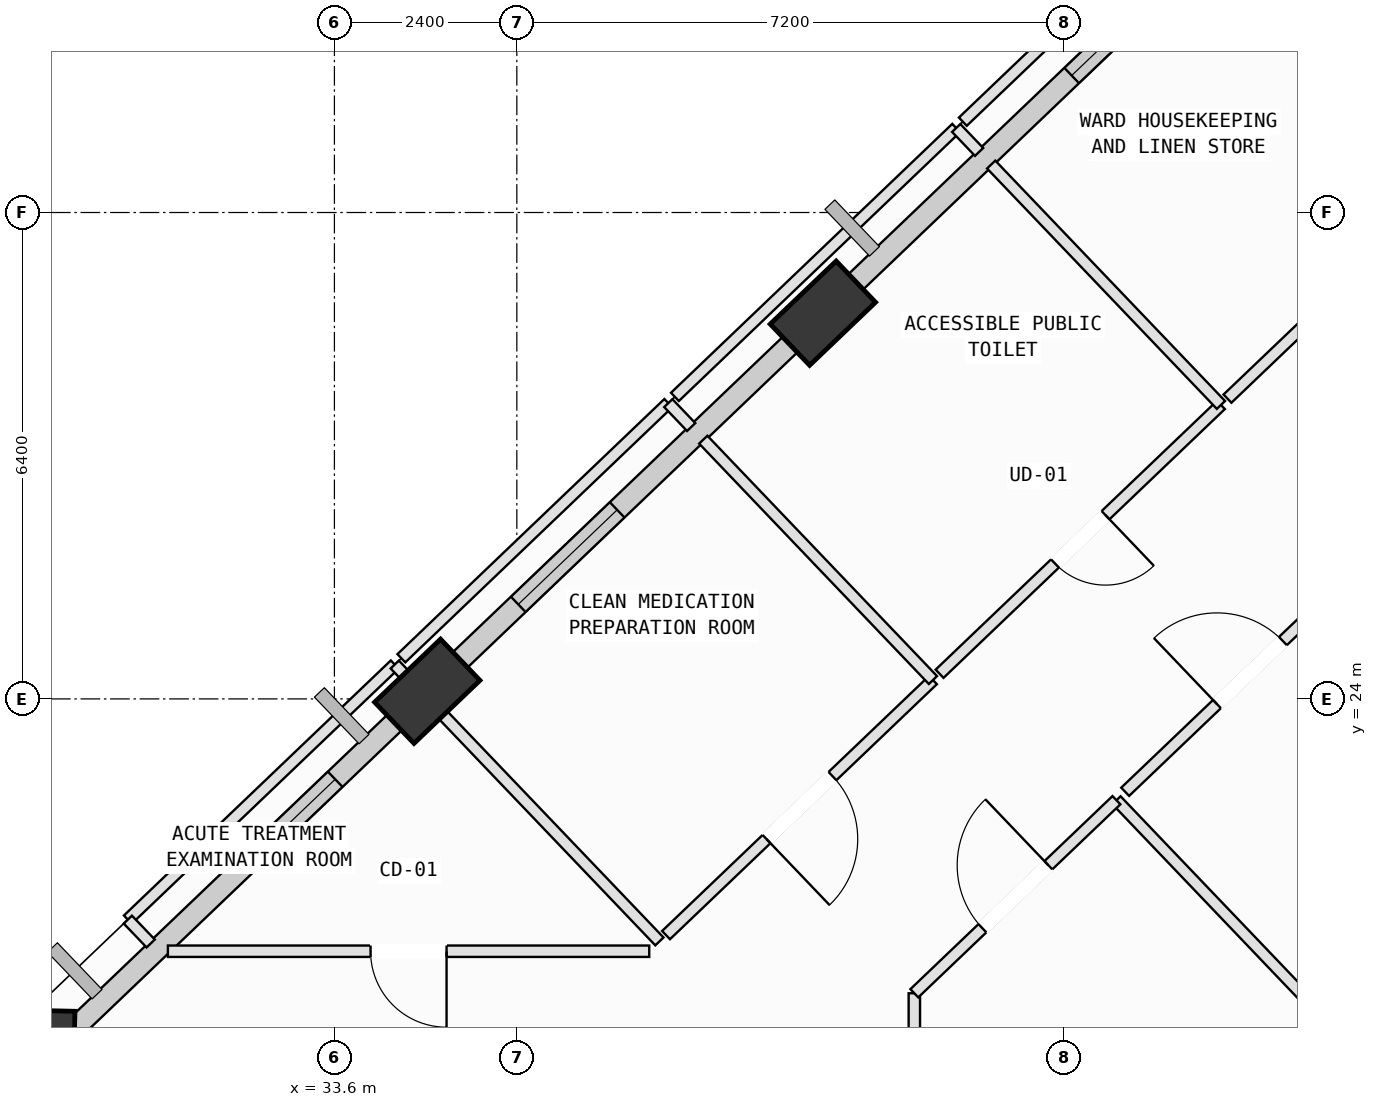
"""IFC4 building model, lengths in metres.
Left out: names, types, materials, properties, quantities, classifications, styles, units other than length and angle.
Written with IfcOpenShell. Run it as: python <this file> out.ifc"""

import sys

from ifc_helpers import new_model, si_unit, direction, frame, frame_2d, origin, origin_2d, place, context, subcontext, project, spatial, rectangle, extrude, element, fill, save


model = new_model("IFC4")
c1 = context("Model", 3, precision=1e-05, world=origin(), true_north=direction((0.0, 1.0)))
c2 = subcontext(c1, "Body", "Model", "MODEL_VIEW")
j1 = project(units=[si_unit("LENGTHUNIT", "METRE"), si_unit("PLANEANGLEUNIT", "RADIAN")], contexts=[c1])
p1 = place(None, origin())
s1 = spatial("IfcSite", under=j1, at=p1, CompositionType="ELEMENT")
p2 = place(p1, origin())
s2 = spatial("IfcBuilding", under=s1, at=p2, CompositionType="ELEMENT")
p3 = place(p2, frame((0.0, 0.0, 211.2)))
s3 = spatial("IfcBuildingStorey", under=s2, at=p3, CompositionType="ELEMENT", Elevation=211.2)
p4 = place(p3, frame((40.027, 29.075, 0.024), z_axis=(-0.017930255062, 0.026465547712, 0.999488909762), x_axis=(-0.211225801322, -0.977187740345, 0.022085764091)))
e1 = element("IfcColumn", 1, at=p4, inside=s3, PredefinedType="COLUMN", context=c2, shape_type="SweptSolid", body=[
    extrude(rectangle(XDim=1.2, YDim=0.75, at=origin_2d()), origin(), (0.0, 0.0, 1.0), 3.976),
])
p5 = place(p3, frame((34.822, 24.1, 0.007), z_axis=(0.002874568821, 0.005076366216, 0.999982983535), x_axis=(-0.969530948602, -0.244935696243, 0.004030435313)))
e2 = element("IfcColumn", 2, at=p5, inside=s3, PredefinedType="COLUMN", context=c2, shape_type="SweptSolid", body=[
    extrude(rectangle(XDim=1.2, YDim=0.75, at=origin_2d()), origin(), (0.0, 0.0, 1.0), 3.992),
])
p6 = place(p3, frame((29.798, 19.298, 0.019), z_axis=(0.022938777207, -0.015578741739, 0.999615483727), x_axis=(-0.813978214162, 0.580233554641, 0.027721633021)))
e3 = element("IfcColumn", 3, at=p6, inside=s3, PredefinedType="COLUMN", context=c2, shape_type="SweptSolid", body=[
    extrude(rectangle(XDim=1.2, YDim=0.75, at=origin_2d()), origin(), (0.0, 0.0, 1.0), 3.98),
])
p7 = place(p3, frame((45.703, 34.124, 0.0), z_axis=(0.0, 0.0, 1.0), x_axis=(0.793258339764, -0.608885216108, 0.0)))
e4 = element("IfcWall", 4, at=p7, inside=s3, PredefinedType="SOLIDWALL", context=c2, shape_type="SweptSolid", body=[
    extrude(rectangle(XDim=9.036, YDim=0.28, at=frame_2d((4.518, 0.0))), origin(), (0.0, 0.0, 1.0), 3.265),
])
p8 = place(p7, frame((1.479, 0.0, 0.75)))
e5 = element("IfcOpeningElement", 5, at=p8, cuts=e4, PredefinedType="OPENING", context=c2, shape_type="SweptSolid", body=[
    extrude(rectangle(XDim=2.0, YDim=1.95, at=frame_2d((1.0, 0.975))), frame((0.0, 0.15, 0.0), z_axis=(0.0, -1.0, 0.0), x_axis=(1.0, 0.0, 0.0)), (0.0, 0.0, 1.0), 0.3),
])
p9 = place(p3, frame((40.319, 29.353, 0.0), z_axis=(0.0, 0.0, 1.0), x_axis=(0.722967108735, 0.690882449977, 0.0)))
e6 = element("IfcWall", 6, at=p9, inside=s3, PredefinedType="SOLIDWALL", context=c2, shape_type="SweptSolid", body=[
    extrude(rectangle(XDim=6.78, YDim=0.28, at=frame_2d((3.39, 0.0))), origin(), (0.0, 0.0, 1.0), 2.765),
])
p10 = place(p9, frame((4.124, 0.0, 0.75)))
e7 = element("IfcOpeningElement", 7, at=p10, cuts=e6, PredefinedType="OPENING", context=c2, shape_type="SweptSolid", body=[
    extrude(rectangle(XDim=1.4, YDim=1.85, at=frame_2d((0.7, 0.925))), frame((0.0, 0.15, 0.0), z_axis=(0.0, -1.0, 0.0), x_axis=(1.0, 0.0, 0.0)), (0.0, 0.0, 1.0), 0.3),
])
p11 = place(p3, frame((35.117, 24.383, 0.0), z_axis=(0.0, 0.0, 1.0), x_axis=(0.722980120971, 0.690868833195, 0.0)))
e8 = element("IfcWall", 8, at=p11, inside=s3, PredefinedType="SOLIDWALL", context=c2, shape_type="SweptSolid", body=[
    extrude(rectangle(XDim=6.409, YDim=0.28, at=frame_2d((3.205, 0.0))), origin(), (0.0, 0.0, 1.0), 3.265),
])
p12 = place(p11, frame((1.247, 0.0, 0.75)))
e9 = element("IfcOpeningElement", 9, at=p12, cuts=e8, PredefinedType="OPENING", context=c2, shape_type="SweptSolid", body=[
    extrude(rectangle(XDim=1.8, YDim=2.05, at=frame_2d((0.9, 1.025))), frame((0.0, 0.15, 0.0), z_axis=(0.0, -1.0, 0.0), x_axis=(1.0, 0.0, 0.0)), (0.0, 0.0, 1.0), 0.3),
])
p13 = place(p3, frame((30.09, 19.579, 0.0), z_axis=(0.0, 0.0, 1.0), x_axis=(0.722961207673, 0.690888625033, 0.0)))
e10 = element("IfcWall", 10, at=p13, inside=s3, PredefinedType="SOLIDWALL", context=c2, shape_type="SweptSolid", body=[
    extrude(rectangle(XDim=6.158, YDim=0.28, at=frame_2d((3.079, 0.0))), origin(), (0.0, 0.0, 1.0), 2.765),
])
p14 = place(p13, frame((3.669, 0.0, 0.75)))
e11 = element("IfcOpeningElement", 11, at=p14, cuts=e10, PredefinedType="OPENING", context=c2, shape_type="SweptSolid", body=[
    extrude(rectangle(XDim=1.2, YDim=1.75, at=frame_2d((0.6, 0.875))), frame((0.0, 0.15, 0.0), z_axis=(0.0, -1.0, 0.0), x_axis=(1.0, 0.0, 0.0)), (0.0, 0.0, 1.0), 0.3),
])
p15 = place(p3, frame((43.889, 22.667, 0.0), z_axis=(0.0, 0.0, 1.0), x_axis=(0.690910559681, -0.722940245471, 0.0)))
e12 = element("IfcWall", 12, at=p15, inside=s3, PredefinedType="PARTITIONING", context=c2, shape_type="SweptSolid", body=[
    extrude(rectangle(XDim=13.484, YDim=0.15, at=frame_2d((6.742, 0.0))), origin(), (0.0, 0.0, 1.0), 3.415),
])
p16 = place(p3, frame((41.23, 18.828, 0.0), z_axis=(0.0, 0.0, 1.0), x_axis=(0.0, 1.0, 0.0)))
e13 = element("IfcWall", 13, at=p16, inside=s3, PredefinedType="PARTITIONING", context=c2, shape_type="SweptSolid", body=[
    extrude(rectangle(XDim=1.299, YDim=0.15, at=frame_2d((0.649, 0.0))), origin(), (0.0, 0.0, 1.0), 3.78),
])
p17 = place(p3, frame((41.23, 20.127, 0.0), z_axis=(0.0, 0.0, 1.0), x_axis=(0.723088697015, 0.690755192705, 0.0)))
e14 = element("IfcWall", 14, at=p17, inside=s3, PredefinedType="PARTITIONING", context=c2, shape_type="SweptSolid", body=[
    extrude(rectangle(XDim=3.677, YDim=0.15, at=frame_2d((1.839, 0.0))), origin(), (0.0, 0.0, 1.0), 2.765),
])
p18 = place(p17, frame((1.239, 0.0, 0.0)))
e15 = element("IfcOpeningElement", 15, at=p18, cuts=e14, PredefinedType="OPENING", context=c2, shape_type="SweptSolid", body=[
    extrude(rectangle(XDim=1.2, YDim=2.15, at=frame_2d((0.6, 1.075))), frame((0.0, 0.085, 0.0), z_axis=(0.0, -1.0, 0.0), x_axis=(1.0, 0.0, 0.0)), (0.0, 0.0, 1.0), 0.17),
])
p19 = place(p3, frame((44.004, 22.778, 0.0), z_axis=(0.0, 0.0, 1.0), x_axis=(0.723025899483, 0.69082092374, 0.0)))
e16 = element("IfcWall", 16, at=p19, inside=s3, PredefinedType="PARTITIONING", context=c2, shape_type="SweptSolid", body=[
    extrude(rectangle(XDim=4.541, YDim=0.15, at=frame_2d((2.271, 0.0))), origin(), (0.0, 0.0, 1.0), 2.765),
])
p20 = place(p19, frame((1.67, 0.0, 0.0)))
e17 = element("IfcOpeningElement", 17, at=p20, cuts=e16, PredefinedType="OPENING", context=c2, shape_type="SweptSolid", body=[
    extrude(rectangle(XDim=1.2, YDim=2.15, at=frame_2d((0.6, 1.075))), frame((0.0, 0.085, 0.0), z_axis=(0.0, -1.0, 0.0), x_axis=(1.0, 0.0, 0.0)), (0.0, 0.0, 1.0), 0.17),
])
p21 = place(p3, frame((30.882, 21.096, 0.0), z_axis=(0.0, 0.0, 1.0), x_axis=(0.722982323173, 0.690866528629, 0.0)))
e18 = element("IfcWall", 18, at=p21, inside=s3, PredefinedType="PARTITIONING", context=c2, shape_type="SweptSolid", body=[
    extrude(rectangle(XDim=4.858, YDim=0.15, at=frame_2d((2.429, 0.0))), origin(), (0.0, 0.0, 1.0), 3.78),
])
p22 = place(p3, frame((34.394, 24.452, 0.0), z_axis=(0.0, 0.0, 1.0), x_axis=(0.690963001326, -0.7228901236, 0.0)))
e19 = element("IfcWall", 19, at=p22, inside=s3, PredefinedType="PARTITIONING", context=c2, shape_type="SweptSolid", body=[
    extrude(rectangle(XDim=5.039, YDim=0.15, at=frame_2d((2.52, 0.0))), origin(), (0.0, 0.0, 1.0), 3.78),
])
p23 = place(p3, frame((37.742, 20.68, 0.0), z_axis=(0.0, 0.0, 1.0), x_axis=(-1.0, 0.0, 0.0)))
e20 = element("IfcWall", 20, at=p23, inside=s3, PredefinedType="PARTITIONING", context=c2, shape_type="SweptSolid", body=[
    extrude(rectangle(XDim=6.333, YDim=0.15, at=frame_2d((3.167, 0.0))), origin(), (0.0, 0.0, 1.0), 3.78),
])
p24 = place(p23, frame((2.667, 0.0, 0.0)))
e21 = element("IfcOpeningElement", 21, at=p24, cuts=e20, PredefinedType="OPENING", context=c2, shape_type="SweptSolid", body=[
    extrude(rectangle(XDim=1.0, YDim=2.12, at=frame_2d((0.5, 1.06))), frame((0.0, 0.085, 0.0), z_axis=(0.0, -1.0, 0.0), x_axis=(1.0, 0.0, 0.0)), (0.0, 0.0, 1.0), 0.17),
])
p25 = place(p3, frame((31.183, 20.782, 0.0), z_axis=(0.0, 0.0, 1.0), x_axis=(-0.692076018043, 0.721824622225, 0.0)))
e22 = element("IfcWall", 22, at=p25, inside=s3, PredefinedType="PARTITIONING", context=c2, shape_type="SweptSolid", body=[
    extrude(rectangle(XDim=0.435, YDim=0.15, at=frame_2d((0.218, 0.0))), origin(), (0.0, 0.0, 1.0), 3.78),
])
p26 = place(p3, frame((41.475, 24.248, 0.0), z_axis=(0.0, 0.0, 1.0), x_axis=(-0.723006310532, -0.690841425315, 0.0)))
e23 = element("IfcWall", 23, at=p26, inside=s3, PredefinedType="PARTITIONING", context=c2, shape_type="SweptSolid", body=[
    extrude(rectangle(XDim=4.858, YDim=0.15, at=frame_2d((2.429, 0.0))), origin(), (0.0, 0.0, 1.0), 2.765),
])
p27 = place(p26, frame((1.829, 0.0, 0.0)))
e24 = element("IfcOpeningElement", 24, at=p27, cuts=e23, PredefinedType="OPENING", context=c2, shape_type="SweptSolid", body=[
    extrude(rectangle(XDim=1.2, YDim=2.15, at=frame_2d((0.6, 1.075))), frame((0.0, 0.085, 0.0), z_axis=(0.0, -1.0, 0.0), x_axis=(1.0, 0.0, 0.0)), (0.0, 0.0, 1.0), 0.17),
])
p28 = place(p3, frame((34.481, 24.535, 0.0), z_axis=(0.0, 0.0, 1.0), x_axis=(0.722856813983, 0.690997848389, 0.0)))
e25 = element("IfcWall", 25, at=p28, inside=s3, PredefinedType="PARTITIONING", context=c2, shape_type="SweptSolid", body=[
    extrude(rectangle(XDim=4.858, YDim=0.15, at=frame_2d((2.429, 0.0))), origin(), (0.0, 0.0, 1.0), 3.78),
])
p29 = place(p3, frame((37.993, 27.892, 0.0), z_axis=(0.0, 0.0, 1.0), x_axis=(0.6906755607, -0.723164759824, 0.0)))
e26 = element("IfcWall", 26, at=p29, inside=s3, PredefinedType="PARTITIONING", context=c2, shape_type="SweptSolid", body=[
    extrude(rectangle(XDim=0.436, YDim=0.15, at=frame_2d((0.218, 0.0))), origin(), (0.0, 0.0, 1.0), 3.78),
])
p30 = place(p3, frame((38.453, 27.411, 0.0), z_axis=(0.0, 0.0, 1.0), x_axis=(0.690851288879, -0.722996885647, 0.0)))
e27 = element("IfcWall", 27, at=p30, inside=s3, PredefinedType="PARTITIONING", context=c2, shape_type="SweptSolid", body=[
    extrude(rectangle(XDim=4.375, YDim=0.15, at=frame_2d((2.187, 0.0))), origin(), (0.0, 0.0, 1.0), 3.415),
])
p31 = place(p3, frame((45.264, 27.868, 0.0), z_axis=(0.0, 0.0, 1.0), x_axis=(-0.723040441691, -0.690805703276, 0.0)))
e28 = element("IfcWall", 28, at=p31, inside=s3, PredefinedType="PARTITIONING", context=c2, shape_type="SweptSolid", body=[
    extrude(rectangle(XDim=5.12, YDim=0.15, at=frame_2d((2.56, 0.0))), origin(), (0.0, 0.0, 1.0), 3.78),
])
p32 = place(p31, frame((2.1, 0.0, 0.0)))
e29 = element("IfcOpeningElement", 29, at=p32, cuts=e28, PredefinedType="OPENING", context=c2, shape_type="SweptSolid", body=[
    extrude(rectangle(XDim=0.92, YDim=2.1, at=frame_2d((0.46, 1.05))), frame((0.0, 0.085, 0.0), z_axis=(0.0, -1.0, 0.0), x_axis=(1.0, 0.0, 0.0)), (0.0, 0.0, 1.0), 0.17),
])
p33 = place(p3, frame((38.08, 27.974, 0.0), z_axis=(0.0, 0.0, 1.0), x_axis=(0.7228541217, 0.69100066479, 0.0)))
e30 = element("IfcWall", 30, at=p33, inside=s3, PredefinedType="PARTITIONING", context=c2, shape_type="SweptSolid", body=[
    extrude(rectangle(XDim=5.12, YDim=0.15, at=frame_2d((2.56, 0.0))), origin(), (0.0, 0.0, 1.0), 3.265),
])
p34 = place(p3, frame((41.781, 31.512, 0.0), z_axis=(0.0, 0.0, 1.0), x_axis=(0.690955405994, -0.7228973834, 0.0)))
e31 = element("IfcWall", 31, at=p34, inside=s3, PredefinedType="PARTITIONING", context=c2, shape_type="SweptSolid", body=[
    extrude(rectangle(XDim=0.436, YDim=0.15, at=frame_2d((0.218, 0.0))), origin(), (0.0, 0.0, 1.0), 3.78),
])
p35 = place(p3, frame((42.241, 31.031, 0.0), z_axis=(0.0, 0.0, 1.0), x_axis=(0.690910919036, -0.722939902037, 0.0)))
e32 = element("IfcWall", 32, at=p35, inside=s3, PredefinedType="PARTITIONING", context=c2, shape_type="SweptSolid", body=[
    extrude(rectangle(XDim=4.375, YDim=0.15, at=frame_2d((2.188, 0.0))), origin(), (0.0, 0.0, 1.0), 3.78),
])
p36 = place(p3, frame((49.006, 31.444, 0.0), z_axis=(0.0, 0.0, 1.0), x_axis=(-0.723025524687, -0.690821316008, 0.0)))
e33 = element("IfcWall", 33, at=p36, inside=s3, PredefinedType="PARTITIONING", context=c2, shape_type="SweptSolid", body=[
    extrude(rectangle(XDim=5.057, YDim=0.15, at=frame_2d((2.528, 0.0))), origin(), (0.0, 0.0, 1.0), 3.78),
])
p37 = place(p36, frame((2.068, 0.0, 0.0)))
e34 = element("IfcOpeningElement", 34, at=p37, cuts=e33, PredefinedType="OPENING", context=c2, shape_type="SweptSolid", body=[
    extrude(rectangle(XDim=0.92, YDim=2.1, at=frame_2d((0.46, 1.05))), frame((0.0, 0.085, 0.0), z_axis=(0.0, -1.0, 0.0), x_axis=(1.0, 0.0, 0.0)), (0.0, 0.0, 1.0), 0.17),
])
p38 = place(p3, frame((41.868, 31.595, 0.0), z_axis=(0.0, 0.0, 1.0), x_axis=(0.723021413842, 0.690825618464, 0.0)))
e35 = element("IfcWall", 35, at=p38, inside=s3, PredefinedType="PARTITIONING", context=c2, shape_type="SweptSolid", body=[
    extrude(rectangle(XDim=5.028, YDim=0.15, at=frame_2d((2.514, 0.0))), origin(), (0.0, 0.0, 1.0), 2.765),
])
p39 = place(p10, origin())
e36 = element("IfcWindow", 36, at=p39, inside=s3, PartitioningType="SINGLE_PANEL", PredefinedType="WINDOW", context=c2, shape_type="SweptSolid", body=[
    extrude(rectangle(XDim=1.4, YDim=1.85, at=frame_2d((0.7, 0.925))), frame((0.0, 0.03, 0.0), z_axis=(0.0, -1.0, 0.0), x_axis=(1.0, 0.0, 0.0)), (0.0, 0.0, 1.0), 0.06),
])
fill(e7, e36)
p40 = place(p12, origin())
e37 = element("IfcWindow", 37, at=p40, inside=s3, PartitioningType="SINGLE_PANEL", PredefinedType="WINDOW", context=c2, shape_type="SweptSolid", body=[
    extrude(rectangle(XDim=1.8, YDim=2.05, at=frame_2d((0.9, 1.025))), frame((0.0, 0.03, 0.0), z_axis=(0.0, -1.0, 0.0), x_axis=(1.0, 0.0, 0.0)), (0.0, 0.0, 1.0), 0.06),
])
fill(e9, e37)
p41 = place(p14, origin())
e38 = element("IfcWindow", 38, at=p41, inside=s3, PartitioningType="SINGLE_PANEL", PredefinedType="WINDOW", context=c2, shape_type="SweptSolid", body=[
    extrude(rectangle(XDim=1.2, YDim=1.75, at=frame_2d((0.6, 0.875))), frame((0.0, 0.03, 0.0), z_axis=(0.0, -1.0, 0.0), x_axis=(1.0, 0.0, 0.0)), (0.0, 0.0, 1.0), 0.06),
])
fill(e11, e38)
p42 = place(p18, origin())
e39 = element("IfcDoor", 39, at=p42, inside=s3, OperationType="SINGLE_SWING_RIGHT", PredefinedType="DOOR", context=c2, shape_type="SweptSolid", body=[
    extrude(rectangle(XDim=1.2, YDim=2.15, at=frame_2d((0.6, 1.075))), frame((0.0, 0.025, 0.0), z_axis=(0.0, -1.0, 0.0), x_axis=(1.0, 0.0, 0.0)), (0.0, 0.0, 1.0), 0.05),
])
fill(e15, e39)
p43 = place(p20, origin())
e40 = element("IfcDoor", 40, at=p43, inside=s3, OperationType="SINGLE_SWING_LEFT", PredefinedType="DOOR", context=c2, shape_type="SweptSolid", body=[
    extrude(rectangle(XDim=1.2, YDim=2.15, at=frame_2d((0.6, 1.075))), frame((0.0, 0.025, 0.0), z_axis=(0.0, -1.0, 0.0), x_axis=(1.0, 0.0, 0.0)), (0.0, 0.0, 1.0), 0.05),
])
fill(e17, e40)
p44 = place(p24, origin())
e41 = element("IfcDoor", 41, at=p44, inside=s3, OperationType="SINGLE_SWING_LEFT", PredefinedType="DOOR", context=c2, shape_type="SweptSolid", body=[
    extrude(rectangle(XDim=1.0, YDim=2.12, at=frame_2d((0.5, 1.06))), frame((0.0, 0.025, 0.0), z_axis=(0.0, -1.0, 0.0), x_axis=(1.0, 0.0, 0.0)), (0.0, 0.0, 1.0), 0.05),
])
fill(e21, e41)
p45 = place(p27, origin())
e42 = element("IfcDoor", 42, at=p45, inside=s3, OperationType="SINGLE_SWING_RIGHT", PredefinedType="DOOR", context=c2, shape_type="SweptSolid", body=[
    extrude(rectangle(XDim=1.2, YDim=2.15, at=frame_2d((0.6, 1.075))), frame((0.0, 0.025, 0.0), z_axis=(0.0, -1.0, 0.0), x_axis=(1.0, 0.0, 0.0)), (0.0, 0.0, 1.0), 0.05),
])
fill(e24, e42)
p46 = place(p32, origin())
e43 = element("IfcDoor", 43, at=p46, inside=s3, OperationType="SINGLE_SWING_LEFT", PredefinedType="DOOR", context=c2, shape_type="SweptSolid", body=[
    extrude(rectangle(XDim=0.92, YDim=2.1, at=frame_2d((0.46, 1.05))), frame((0.0, 0.025, 0.0), z_axis=(0.0, -1.0, 0.0), x_axis=(1.0, 0.0, 0.0)), (0.0, 0.0, 1.0), 0.05),
])
fill(e29, e43)
save(model, sys.argv[1])
